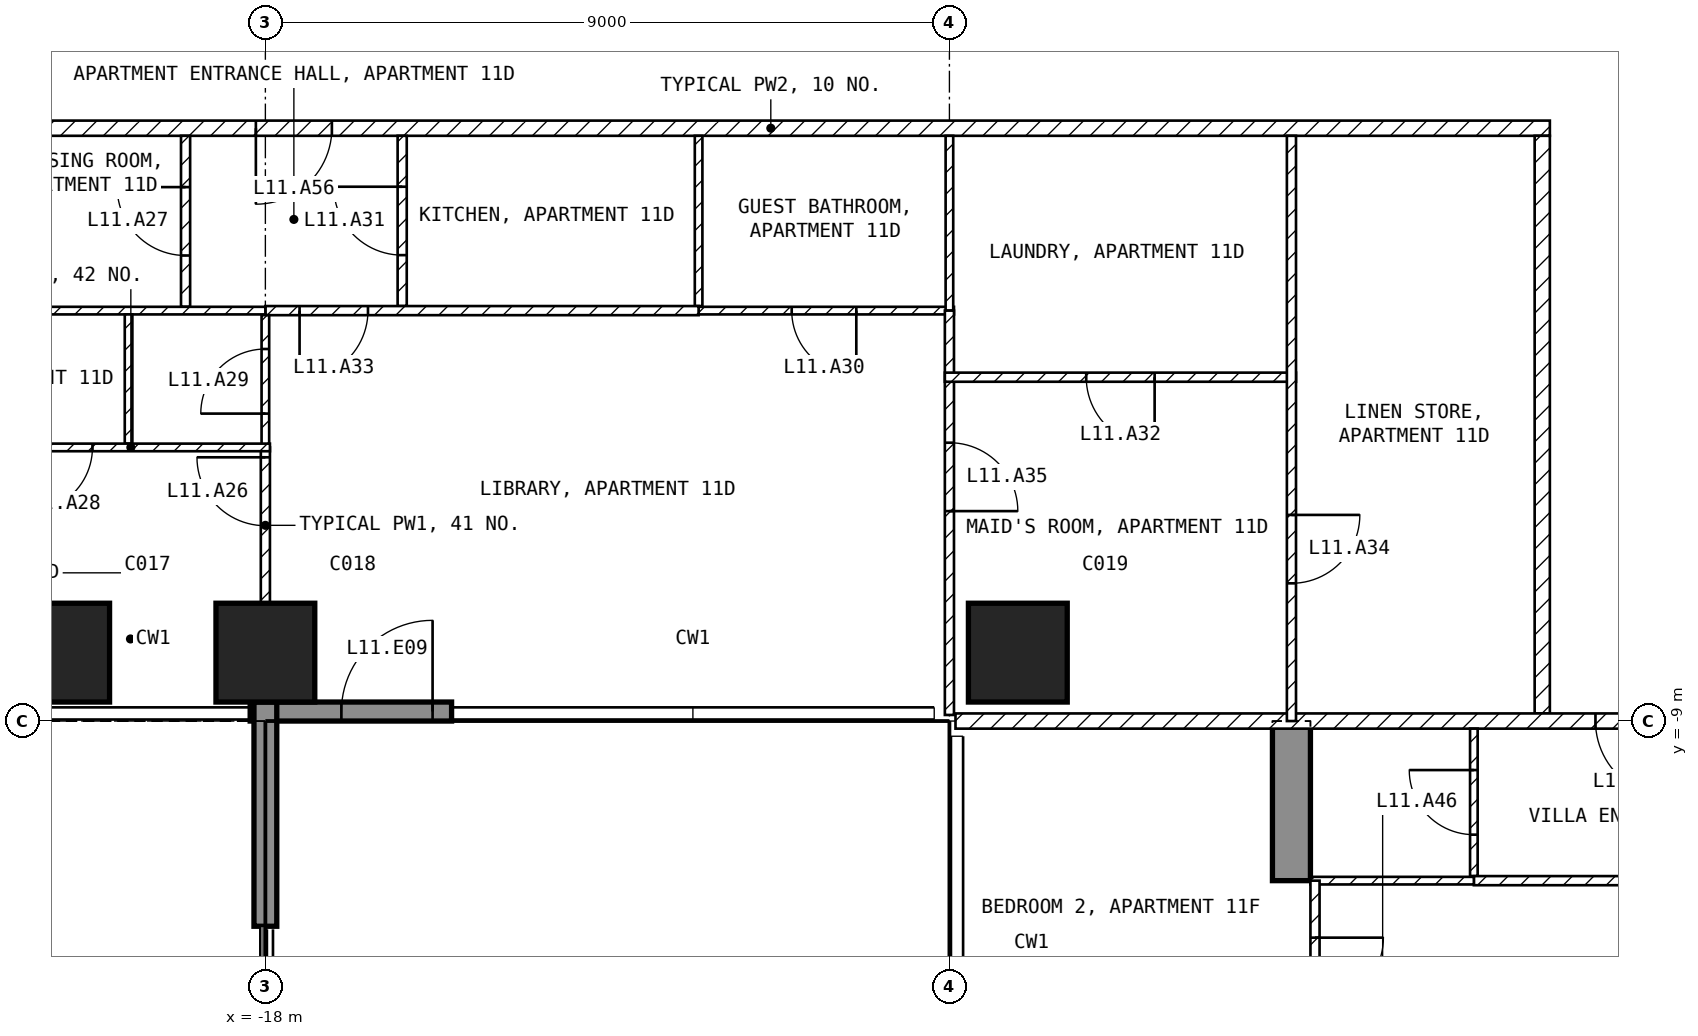
"""IFC4 building model, lengths in metres.
Left out: names, types, materials, properties, quantities, classifications, styles, units other than length and angle.
Written with IfcOpenShell. Run it as: python <this file> out.ifc"""

import sys

from ifc_helpers import new_model, si_unit, direction, frame, frame_2d, origin, origin_2d, place, context, subcontext, project, spatial, polyline, rectangle, outline, extrude, element, fill, save


model = new_model("IFC4")
c1 = context("Model", 3, precision=1e-05, world=origin(), true_north=direction((0.0, 1.0)))
c2 = subcontext(c1, "Body", "Model", "MODEL_VIEW")
j1 = project(units=[si_unit("LENGTHUNIT", "METRE"), si_unit("PLANEANGLEUNIT", "RADIAN")], contexts=[c1])
p1 = place(None, origin())
s1 = spatial("IfcSite", under=j1, at=p1, CompositionType="ELEMENT")
p2 = place(p1, origin())
s2 = spatial("IfcBuilding", under=s1, at=p2, CompositionType="ELEMENT")
p3 = place(p2, frame((0.0, 0.0, 57.5)))
s3 = spatial("IfcBuildingStorey", under=s2, at=p3, CompositionType="ELEMENT", Elevation=57.5)
for number, where, z_axis, x_axis in (
    (1, (-20.7, -8.1, -0.25), (0.0, 0.0, 1.0), (1.0, 0.0, 0.0)),
    (2, (-18.0, -8.1, -0.25), (0.0, 0.0, 1.0), (1.0, 0.0, 0.0)),
    (3, (-8.1, -8.1, -0.25), (0.0, 0.0, 1.0), (1.0, 0.0, 0.0)),
):
    element("IfcColumn", number, at=place(p3, frame(where, z_axis=z_axis, x_axis=x_axis)), inside=s3, PredefinedType="COLUMN", context=c2, shape_type="SweptSolid", body=[
        extrude(rectangle(XDim=1.3, YDim=1.3, at=origin_2d()), origin(), (0.0, 0.0, 1.0), 3.5),
    ])
p4 = place(p3, frame((-4.75, -25.45, -0.25), z_axis=(1.0, 0.0, 0.0), x_axis=(0.0, 1.0, 0.0)))
e4 = element("IfcWall", 4, at=p4, inside=s3, PredefinedType="SHEAR", context=c2, shape_type="SweptSolid", body=[
    extrude(outline(polyline([(0.0, 0.0), (4.15, 0.0), (4.15, 2.65), (6.55, 2.65), (6.55, 0.0), (11.95, 0.0), (11.95, 2.65), (14.35, 2.65), (14.35, 0.0), (16.45, 0.0), (16.45, 3.5), (0.0, 3.5), (0.0, 0.0)])), origin(), (0.0, 0.0, 1.0), 0.5),
])
p5 = place(p3, frame((-18.2, -8.875, 0.0), z_axis=(0.0, 0.0, 1.0), x_axis=(1.0, 0.0, 0.0)))
e5 = element("IfcWall", 5, at=p5, inside=s3, PredefinedType="SOLIDWALL", context=c2, shape_type="SweptSolid", body=[
    extrude(rectangle(XDim=2.65, YDim=0.25, at=frame_2d((1.325, 0.0))), origin(), (0.0, 0.0, 1.0), 3.25),
])
p6 = place(p5, frame((1.2, 0.0, 0.0)))
e6 = element("IfcOpeningElement", 6, at=p6, cuts=e5, PredefinedType="OPENING", context=c2, shape_type="SweptSolid", body=[
    extrude(rectangle(XDim=1.2, YDim=2.4, at=frame_2d((0.6, 1.2))), frame((0.0, 0.135, 0.0), z_axis=(0.0, -1.0, 0.0), x_axis=(1.0, 0.0, 0.0)), (0.0, 0.0, 1.0), 0.27),
])
p7 = place(p3, frame((-18.0, -8.75, 0.0), z_axis=(0.0, 0.0, 1.0), x_axis=(0.0, -1.0, 0.0)))
e7 = element("IfcWall", 7, at=p7, inside=s3, PredefinedType="SOLIDWALL", context=c2, shape_type="SweptSolid", body=[
    extrude(rectangle(XDim=2.95, YDim=0.3, at=frame_2d((1.475, 0.0))), origin(), (0.0, 0.0, 1.0), 3.25),
])
p8 = place(p3, frame((-1.1, -1.2, 0.0), z_axis=(0.0, 0.0, 1.0), x_axis=(-1.0, 0.0, 0.0)))
e8 = element("IfcWall", 8, at=p8, inside=s3, PredefinedType="PARTITIONING", context=c2, shape_type="SweptSolid", body=[
    extrude(rectangle(XDim=20.5, YDim=0.2, at=frame_2d((10.25, 0.0))), origin(), (0.0, 0.0, 1.0), 3.25),
])
p9 = place(p8, frame((16.025, 0.0, 0.0)))
e9 = element("IfcOpeningElement", 9, at=p9, cuts=e8, PredefinedType="OPENING", context=c2, shape_type="SweptSolid", body=[
    extrude(rectangle(XDim=1.0, YDim=2.1, at=frame_2d((0.5, 1.05))), frame((0.0, 0.11, 0.0), z_axis=(0.0, -1.0, 0.0), x_axis=(1.0, 0.0, 0.0)), (0.0, 0.0, 1.0), 0.22),
])
p10 = place(p3, frame((-1.2, -8.9, 0.0), z_axis=(0.0, 0.0, 1.0), x_axis=(0.0, 1.0, 0.0)))
e10 = element("IfcWall", 10, at=p10, inside=s3, PredefinedType="PARTITIONING", context=c2, shape_type="SweptSolid", body=[
    extrude(rectangle(XDim=7.6, YDim=0.2, at=frame_2d((3.8, 0.0))), origin(), (0.0, 0.0, 1.0), 3.25),
])
p11 = place(p3, frame((8.92, -9.0, 0.0), z_axis=(0.0, 0.0, 1.0), x_axis=(-1.0, 0.0, 0.0)))
e11 = element("IfcWall", 11, at=p11, inside=s3, PredefinedType="PARTITIONING", context=c2, shape_type="SweptSolid", body=[
    extrude(rectangle(XDim=17.84, YDim=0.2, at=frame_2d((8.92, 0.0))), origin(), (0.0, 0.0, 1.0), 3.25),
])
p12 = place(p11, frame((8.42, 0.0, 0.0)))
e12 = element("IfcOpeningElement", 12, at=p12, cuts=e11, PredefinedType="OPENING", context=c2, shape_type="SweptSolid", body=[
    extrude(rectangle(XDim=1.0, YDim=2.1, at=frame_2d((0.5, 1.05))), frame((0.0, 0.11, 0.0), z_axis=(0.0, -1.0, 0.0), x_axis=(1.0, 0.0, 0.0)), (0.0, 0.0, 1.0), 0.22),
])
p13 = place(p3, frame((-12.3, -3.54, 0.0), z_axis=(0.0, 0.0, 1.0), x_axis=(0.0, 1.0, 0.0)))
e13 = element("IfcWall", 13, at=p13, inside=s3, PredefinedType="PARTITIONING", context=c2, shape_type="SweptSolid", body=[
    extrude(rectangle(XDim=2.24, YDim=0.1, at=frame_2d((1.12, 0.0))), origin(), (0.0, 0.0, 1.0), 3.25),
])
p14 = place(p3, frame((-8.94, -3.6, 0.0), z_axis=(0.0, 0.0, 1.0), x_axis=(-1.0, 0.0, 0.0)))
e14 = element("IfcWall", 14, at=p14, inside=s3, PredefinedType="PARTITIONING", context=c2, shape_type="SweptSolid", body=[
    extrude(rectangle(XDim=3.36, YDim=0.1, at=frame_2d((1.68, 0.0))), origin(), (0.0, 0.0, 1.0), 3.25),
])
p15 = place(p14, frame((1.285, 0.0, 0.0)))
e15 = element("IfcOpeningElement", 15, at=p15, cuts=e14, PredefinedType="OPENING", context=c2, shape_type="SweptSolid", body=[
    extrude(rectangle(XDim=0.85, YDim=2.1, at=frame_2d((0.425, 1.05))), frame((0.0, 0.06, 0.0), z_axis=(0.0, -1.0, 0.0), x_axis=(1.0, 0.0, 0.0)), (0.0, 0.0, 1.0), 0.12),
])
p16 = place(p3, frame((-9.0, -1.3, 0.0), z_axis=(0.0, 0.0, 1.0), x_axis=(0.0, -1.0, 0.0)))
e16 = element("IfcWall", 16, at=p16, inside=s3, PredefinedType="PARTITIONING", context=c2, shape_type="SweptSolid", body=[
    extrude(rectangle(XDim=2.3, YDim=0.1, at=frame_2d((1.15, 0.0))), origin(), (0.0, 0.0, 1.0), 3.25),
])
p17 = place(p3, frame((-16.2, -3.54, 0.0), z_axis=(0.0, 0.0, 1.0), x_axis=(0.0, 1.0, 0.0)))
e17 = element("IfcWall", 17, at=p17, inside=s3, PredefinedType="PARTITIONING", context=c2, shape_type="SweptSolid", body=[
    extrude(rectangle(XDim=2.24, YDim=0.12, at=frame_2d((1.12, 0.0))), origin(), (0.0, 0.0, 1.0), 3.25),
])
p18 = place(p17, frame((0.67, 0.0, 0.0)))
e18 = element("IfcOpeningElement", 18, at=p18, cuts=e17, PredefinedType="OPENING", context=c2, shape_type="SweptSolid", body=[
    extrude(rectangle(XDim=0.9, YDim=2.1, at=frame_2d((0.45, 1.05))), frame((0.0, 0.07, 0.0), z_axis=(0.0, -1.0, 0.0), x_axis=(1.0, 0.0, 0.0)), (0.0, 0.0, 1.0), 0.14),
])
p19 = place(p3, frame((-12.3, -3.6, 0.0), z_axis=(0.0, 0.0, 1.0), x_axis=(-1.0, 0.0, 0.0)))
e19 = element("IfcWall", 19, at=p19, inside=s3, PredefinedType="PARTITIONING", context=c2, shape_type="SweptSolid", body=[
    extrude(rectangle(XDim=5.7, YDim=0.12, at=frame_2d((2.85, 0.0))), origin(), (0.0, 0.0, 1.0), 3.25),
])
p20 = place(p19, frame((4.35, 0.0, 0.0)))
e20 = element("IfcOpeningElement", 20, at=p20, cuts=e19, PredefinedType="OPENING", context=c2, shape_type="SweptSolid", body=[
    extrude(rectangle(XDim=0.9, YDim=2.1, at=frame_2d((0.45, 1.05))), frame((0.0, 0.07, 0.0), z_axis=(0.0, -1.0, 0.0), x_axis=(1.0, 0.0, 0.0)), (0.0, 0.0, 1.0), 0.14),
])
p21 = place(p3, frame((-19.05, -3.55, 0.0), z_axis=(0.0, 0.0, 1.0), x_axis=(0.0, 1.0, 0.0)))
e21 = element("IfcWall", 21, at=p21, inside=s3, PredefinedType="PARTITIONING", context=c2, shape_type="SweptSolid", body=[
    extrude(rectangle(XDim=2.25, YDim=0.12, at=frame_2d((1.125, 0.0))), origin(), (0.0, 0.0, 1.0), 3.25),
])
p22 = place(p21, frame((0.675, 0.0, 0.0)))
e22 = element("IfcOpeningElement", 22, at=p22, cuts=e21, PredefinedType="OPENING", context=c2, shape_type="SweptSolid", body=[
    extrude(rectangle(XDim=0.9, YDim=2.1, at=frame_2d((0.45, 1.05))), frame((0.0, 0.07, 0.0), z_axis=(0.0, -1.0, 0.0), x_axis=(1.0, 0.0, 0.0)), (0.0, 0.0, 1.0), 0.14),
])
p23 = place(p3, frame((-18.0, -3.6, 0.0), z_axis=(0.0, 0.0, 1.0), x_axis=(-1.0, 0.0, 0.0)))
e23 = element("IfcWall", 23, at=p23, inside=s3, PredefinedType="PARTITIONING", context=c2, shape_type="SweptSolid", body=[
    extrude(rectangle(XDim=3.6, YDim=0.1, at=frame_2d((1.8, 0.0))), origin(), (0.0, 0.0, 1.0), 3.25),
])
p24 = place(p3, frame((-18.0, -5.4, 0.0), z_axis=(0.0, 0.0, 1.0), x_axis=(0.0, 1.0, 0.0)))
e24 = element("IfcWall", 24, at=p24, inside=s3, PredefinedType="PARTITIONING", context=c2, shape_type="SweptSolid", body=[
    extrude(rectangle(XDim=1.74, YDim=0.1, at=frame_2d((0.87, 0.0))), origin(), (0.0, 0.0, 1.0), 2.346),
])
p25 = place(p24, frame((0.445, 0.0, 0.0)))
e25 = element("IfcOpeningElement", 25, at=p25, cuts=e24, PredefinedType="OPENING", context=c2, shape_type="SweptSolid", body=[
    extrude(rectangle(XDim=0.85, YDim=2.1, at=frame_2d((0.425, 1.05))), frame((0.0, 0.06, 0.0), z_axis=(0.0, -1.0, 0.0), x_axis=(1.0, 0.0, 0.0)), (0.0, 0.0, 1.0), 0.12),
])
p26 = place(p3, frame((-18.0, -7.45, 0.0), z_axis=(0.0, 0.0, 1.0), x_axis=(0.0, 1.0, 0.0)))
e26 = element("IfcWall", 26, at=p26, inside=s3, PredefinedType="PARTITIONING", context=c2, shape_type="SweptSolid", body=[
    extrude(rectangle(XDim=2.05, YDim=0.12, at=frame_2d((1.025, 0.0))), origin(), (0.0, 0.0, 1.0), 2.346),
])
p27 = place(p26, frame((1.02, 0.0, 0.0)))
e27 = element("IfcOpeningElement", 27, at=p27, cuts=e26, PredefinedType="OPENING", context=c2, shape_type="SweptSolid", body=[
    extrude(rectangle(XDim=0.9, YDim=2.1, at=frame_2d((0.45, 1.05))), frame((0.0, 0.07, 0.0), z_axis=(0.0, -1.0, 0.0), x_axis=(1.0, 0.0, 0.0)), (0.0, 0.0, 1.0), 0.14),
])
p28 = place(p3, frame((-9.0, -3.6, 0.0), z_axis=(0.0, 0.0, 1.0), x_axis=(0.0, -1.0, 0.0)))
e28 = element("IfcWall", 28, at=p28, inside=s3, PredefinedType="PARTITIONING", context=c2, shape_type="SweptSolid", body=[
    extrude(rectangle(XDim=5.32, YDim=0.12, at=frame_2d((2.66, 0.0))), origin(), (0.0, 0.0, 1.0), 3.25),
])
p29 = place(p28, frame((1.738, 0.0, 0.0)))
e29 = element("IfcOpeningElement", 29, at=p29, cuts=e28, PredefinedType="OPENING", context=c2, shape_type="SweptSolid", body=[
    extrude(rectangle(XDim=0.9, YDim=2.1, at=frame_2d((0.45, 1.05))), frame((0.0, 0.07, 0.0), z_axis=(0.0, -1.0, 0.0), x_axis=(1.0, 0.0, 0.0)), (0.0, 0.0, 1.0), 0.14),
])
p30 = place(p3, frame((-19.8, -5.35, 0.0), z_axis=(0.0, 0.0, 1.0), x_axis=(0.0, 1.0, 0.0)))
e30 = element("IfcWall", 30, at=p30, inside=s3, PredefinedType="PARTITIONING", context=c2, shape_type="SweptSolid", body=[
    extrude(rectangle(XDim=1.7, YDim=0.1, at=frame_2d((0.85, 0.0))), origin(), (0.0, 0.0, 1.0), 3.25),
])
p31 = place(p3, frame((-17.94, -5.4, 0.0), z_axis=(0.0, 0.0, 1.0), x_axis=(-1.0, 0.0, 0.0)))
e31 = element("IfcWall", 31, at=p31, inside=s3, PredefinedType="PARTITIONING", context=c2, shape_type="SweptSolid", body=[
    extrude(rectangle(XDim=3.66, YDim=0.1, at=frame_2d((1.83, 0.0))), origin(), (0.0, 0.0, 1.0), 3.25),
])
p32 = place(p31, frame((2.335, 0.0, 0.0)))
e32 = element("IfcOpeningElement", 32, at=p32, cuts=e31, PredefinedType="OPENING", context=c2, shape_type="SweptSolid", body=[
    extrude(rectangle(XDim=0.85, YDim=2.1, at=frame_2d((0.425, 1.05))), frame((0.0, 0.06, 0.0), z_axis=(0.0, -1.0, 0.0), x_axis=(1.0, 0.0, 0.0)), (0.0, 0.0, 1.0), 0.12),
])
p33 = place(p3, frame((-4.44, -4.476, 0.0), z_axis=(0.0, 0.0, 1.0), x_axis=(-1.0, 0.0, 0.0)))
e33 = element("IfcWall", 33, at=p33, inside=s3, PredefinedType="PARTITIONING", context=c2, shape_type="SweptSolid", body=[
    extrude(rectangle(XDim=4.62, YDim=0.12, at=frame_2d((2.31, 0.0))), origin(), (0.0, 0.0, 1.0), 3.25),
])
p34 = place(p33, frame((1.86, 0.0, 0.0)))
e34 = element("IfcOpeningElement", 34, at=p34, cuts=e33, PredefinedType="OPENING", context=c2, shape_type="SweptSolid", body=[
    extrude(rectangle(XDim=0.9, YDim=2.1, at=frame_2d((0.45, 1.05))), frame((0.0, 0.07, 0.0), z_axis=(0.0, -1.0, 0.0), x_axis=(1.0, 0.0, 0.0)), (0.0, 0.0, 1.0), 0.14),
])
p35 = place(p3, frame((-4.5, -1.3, 0.0), z_axis=(0.0, 0.0, 1.0), x_axis=(0.0, -1.0, 0.0)))
e35 = element("IfcWall", 35, at=p35, inside=s3, PredefinedType="PARTITIONING", context=c2, shape_type="SweptSolid", body=[
    extrude(rectangle(XDim=7.7, YDim=0.12, at=frame_2d((3.85, 0.0))), origin(), (0.0, 0.0, 1.0), 3.25),
])
p36 = place(p35, frame((4.988, 0.0, 0.0)))
e36 = element("IfcOpeningElement", 36, at=p36, cuts=e35, PredefinedType="OPENING", context=c2, shape_type="SweptSolid", body=[
    extrude(rectangle(XDim=0.9, YDim=2.1, at=frame_2d((0.45, 1.05))), frame((0.0, 0.07, 0.0), z_axis=(0.0, -1.0, 0.0), x_axis=(1.0, 0.0, 0.0)), (0.0, 0.0, 1.0), 0.14),
])
p37 = place(p3, frame((-2.1, -11.04, 0.0), z_axis=(0.0, 0.0, 1.0), x_axis=(0.0, 1.0, 0.0)))
e37 = element("IfcWall", 37, at=p37, inside=s3, PredefinedType="PARTITIONING", context=c2, shape_type="SweptSolid", body=[
    extrude(rectangle(XDim=1.94, YDim=0.1, at=frame_2d((0.97, 0.0))), origin(), (0.0, 0.0, 1.0), 3.25),
])
p38 = place(p37, frame((0.545, 0.0, 0.0)))
e38 = element("IfcOpeningElement", 38, at=p38, cuts=e37, PredefinedType="OPENING", context=c2, shape_type="SweptSolid", body=[
    extrude(rectangle(XDim=0.85, YDim=2.1, at=frame_2d((0.425, 1.05))), frame((0.0, 0.06, 0.0), z_axis=(0.0, -1.0, 0.0), x_axis=(1.0, 0.0, 0.0)), (0.0, 0.0, 1.0), 0.12),
])
p39 = place(p3, frame((4.25, -11.1, 0.0), z_axis=(0.0, 0.0, 1.0), x_axis=(-1.0, 0.0, 0.0)))
e39 = element("IfcWall", 39, at=p39, inside=s3, PredefinedType="PARTITIONING", context=c2, shape_type="SweptSolid", body=[
    extrude(rectangle(XDim=6.35, YDim=0.12, at=frame_2d((3.175, 0.0))), origin(), (0.0, 0.0, 1.0), 3.25),
])
p40 = place(p39, frame((2.725, 0.0, 0.0)))
e40 = element("IfcOpeningElement", 40, at=p40, cuts=e39, PredefinedType="OPENING", context=c2, shape_type="SweptSolid", body=[
    extrude(rectangle(XDim=0.9, YDim=2.1, at=frame_2d((0.45, 1.05))), frame((0.0, 0.07, 0.0), z_axis=(0.0, -1.0, 0.0), x_axis=(1.0, 0.0, 0.0)), (0.0, 0.0, 1.0), 0.14),
])
p41 = place(p3, frame((-2.1, -11.1, 0.0), z_axis=(0.0, 0.0, 1.0), x_axis=(-1.0, 0.0, 0.0)))
e41 = element("IfcWall", 41, at=p41, inside=s3, PredefinedType="PARTITIONING", context=c2, shape_type="SweptSolid", body=[
    extrude(rectangle(XDim=2.15, YDim=0.1, at=frame_2d((1.075, 0.0))), origin(), (0.0, 0.0, 1.0), 3.25),
])
p42 = place(p3, frame((-4.19, -11.1, 0.0), z_axis=(0.0, 0.0, 1.0), x_axis=(0.0, -1.0, 0.0)))
e42 = element("IfcWall", 42, at=p42, inside=s3, PredefinedType="PARTITIONING", context=c2, shape_type="SweptSolid", body=[
    extrude(rectangle(XDim=2.4, YDim=0.12, at=frame_2d((1.2, 0.0))), origin(), (0.0, 0.0, 1.0), 2.4),
])
p43 = place(p42, frame((0.75, 0.0, 0.0)))
e43 = element("IfcOpeningElement", 43, at=p43, cuts=e42, PredefinedType="OPENING", context=c2, shape_type="SweptSolid", body=[
    extrude(rectangle(XDim=0.9, YDim=2.1, at=frame_2d((0.45, 1.05))), frame((0.0, 0.07, 0.0), z_axis=(0.0, -1.0, 0.0), x_axis=(1.0, 0.0, 0.0)), (0.0, 0.0, 1.0), 0.14),
])
p44 = place(p6, origin())
e44 = element("IfcDoor", 44, at=p44, inside=s3, OperationType="SINGLE_SWING_RIGHT", PredefinedType="DOOR", context=c2, shape_type="SweptSolid", body=[
    extrude(rectangle(XDim=1.2, YDim=2.4, at=frame_2d((0.6, 1.2))), frame((0.0, 0.025, 0.0), z_axis=(0.0, -1.0, 0.0), x_axis=(1.0, 0.0, 0.0)), (0.0, 0.0, 1.0), 0.05),
])
fill(e6, e44)
p45 = place(p27, origin())
e45 = element("IfcDoor", 45, at=p45, inside=s3, OperationType="SINGLE_SWING_RIGHT", PredefinedType="DOOR", context=c2, shape_type="SweptSolid", body=[
    extrude(rectangle(XDim=0.9, YDim=2.1, at=frame_2d((0.45, 1.05))), frame((0.0, 0.025, 0.0), z_axis=(0.0, -1.0, 0.0), x_axis=(1.0, 0.0, 0.0)), (0.0, 0.0, 1.0), 0.05),
])
fill(e27, e45)
p46 = place(p22, origin())
e46 = element("IfcDoor", 46, at=p46, inside=s3, OperationType="SINGLE_SWING_RIGHT", PredefinedType="DOOR", context=c2, shape_type="SweptSolid", body=[
    extrude(rectangle(XDim=0.9, YDim=2.1, at=frame_2d((0.45, 1.05))), frame((0.0, 0.025, 0.0), z_axis=(0.0, -1.0, 0.0), x_axis=(1.0, 0.0, 0.0)), (0.0, 0.0, 1.0), 0.05),
])
fill(e22, e46)
p47 = place(p32, origin())
e47 = element("IfcDoor", 47, at=p47, inside=s3, OperationType="SINGLE_SWING_RIGHT", PredefinedType="DOOR", context=c2, shape_type="SweptSolid", body=[
    extrude(rectangle(XDim=0.85, YDim=2.1, at=frame_2d((0.425, 1.05))), frame((0.0, 0.025, 0.0), z_axis=(0.0, -1.0, 0.0), x_axis=(1.0, 0.0, 0.0)), (0.0, 0.0, 1.0), 0.05),
])
fill(e32, e47)
p48 = place(p25, origin())
e48 = element("IfcDoor", 48, at=p48, inside=s3, OperationType="SINGLE_SWING_LEFT", PredefinedType="DOOR", context=c2, shape_type="SweptSolid", body=[
    extrude(rectangle(XDim=0.85, YDim=2.1, at=frame_2d((0.425, 1.05))), frame((0.0, 0.025, 0.0), z_axis=(0.0, -1.0, 0.0), x_axis=(1.0, 0.0, 0.0)), (0.0, 0.0, 1.0), 0.05),
])
fill(e25, e48)
p49 = place(p15, origin())
e49 = element("IfcDoor", 49, at=p49, inside=s3, OperationType="SINGLE_SWING_LEFT", PredefinedType="DOOR", context=c2, shape_type="SweptSolid", body=[
    extrude(rectangle(XDim=0.85, YDim=2.1, at=frame_2d((0.425, 1.05))), frame((0.0, 0.025, 0.0), z_axis=(0.0, -1.0, 0.0), x_axis=(1.0, 0.0, 0.0)), (0.0, 0.0, 1.0), 0.05),
])
fill(e15, e49)
p50 = place(p18, origin())
e50 = element("IfcDoor", 50, at=p50, inside=s3, OperationType="SINGLE_SWING_RIGHT", PredefinedType="DOOR", context=c2, shape_type="SweptSolid", body=[
    extrude(rectangle(XDim=0.9, YDim=2.1, at=frame_2d((0.45, 1.05))), frame((0.0, 0.025, 0.0), z_axis=(0.0, -1.0, 0.0), x_axis=(1.0, 0.0, 0.0)), (0.0, 0.0, 1.0), 0.05),
])
fill(e18, e50)
p51 = place(p34, origin())
e51 = element("IfcDoor", 51, at=p51, inside=s3, OperationType="SINGLE_SWING_LEFT", PredefinedType="DOOR", context=c2, shape_type="SweptSolid", body=[
    extrude(rectangle(XDim=0.9, YDim=2.1, at=frame_2d((0.45, 1.05))), frame((0.0, 0.025, 0.0), z_axis=(0.0, -1.0, 0.0), x_axis=(1.0, 0.0, 0.0)), (0.0, 0.0, 1.0), 0.05),
])
fill(e34, e51)
p52 = place(p20, origin())
e52 = element("IfcDoor", 52, at=p52, inside=s3, OperationType="SINGLE_SWING_RIGHT", PredefinedType="DOOR", context=c2, shape_type="SweptSolid", body=[
    extrude(rectangle(XDim=0.9, YDim=2.1, at=frame_2d((0.45, 1.05))), frame((0.0, 0.025, 0.0), z_axis=(0.0, -1.0, 0.0), x_axis=(1.0, 0.0, 0.0)), (0.0, 0.0, 1.0), 0.05),
])
fill(e20, e52)
p53 = place(p36, origin())
e53 = element("IfcDoor", 53, at=p53, inside=s3, OperationType="SINGLE_SWING_LEFT", PredefinedType="DOOR", context=c2, shape_type="SweptSolid", body=[
    extrude(rectangle(XDim=0.9, YDim=2.1, at=frame_2d((0.45, 1.05))), frame((0.0, 0.025, 0.0), z_axis=(0.0, -1.0, 0.0), x_axis=(1.0, 0.0, 0.0)), (0.0, 0.0, 1.0), 0.05),
])
fill(e36, e53)
p54 = place(p29, origin())
e54 = element("IfcDoor", 54, at=p54, inside=s3, OperationType="SINGLE_SWING_RIGHT", PredefinedType="DOOR", context=c2, shape_type="SweptSolid", body=[
    extrude(rectangle(XDim=0.9, YDim=2.1, at=frame_2d((0.45, 1.05))), frame((0.0, 0.025, 0.0), z_axis=(0.0, -1.0, 0.0), x_axis=(1.0, 0.0, 0.0)), (0.0, 0.0, 1.0), 0.05),
])
fill(e29, e54)
p55 = place(p12, origin())
e55 = element("IfcDoor", 55, at=p55, inside=s3, OperationType="SINGLE_SWING_LEFT", PredefinedType="DOOR", context=c2, shape_type="SweptSolid", body=[
    extrude(rectangle(XDim=1.0, YDim=2.1, at=frame_2d((0.5, 1.05))), frame((0.0, 0.025, 0.0), z_axis=(0.0, -1.0, 0.0), x_axis=(1.0, 0.0, 0.0)), (0.0, 0.0, 1.0), 0.05),
])
fill(e12, e55)
p56 = place(p38, origin())
e56 = element("IfcDoor", 56, at=p56, inside=s3, OperationType="SINGLE_SWING_RIGHT", PredefinedType="DOOR", context=c2, shape_type="SweptSolid", body=[
    extrude(rectangle(XDim=0.85, YDim=2.1, at=frame_2d((0.425, 1.05))), frame((0.0, 0.025, 0.0), z_axis=(0.0, -1.0, 0.0), x_axis=(1.0, 0.0, 0.0)), (0.0, 0.0, 1.0), 0.05),
])
fill(e38, e56)
p57 = place(p9, origin())
e57 = element("IfcDoor", 57, at=p57, inside=s3, OperationType="SINGLE_SWING_RIGHT", PredefinedType="DOOR", context=c2, shape_type="SweptSolid", body=[
    extrude(rectangle(XDim=1.0, YDim=2.1, at=frame_2d((0.5, 1.05))), frame((0.0, 0.025, 0.0), z_axis=(0.0, -1.0, 0.0), x_axis=(1.0, 0.0, 0.0)), (0.0, 0.0, 1.0), 0.05),
])
fill(e9, e57)
p58 = place(p43, origin())
e58 = element("IfcDoor", 58, at=p58, inside=s3, OperationType="SINGLE_SWING_LEFT", PredefinedType="DOOR", context=c2, shape_type="SweptSolid", body=[
    extrude(rectangle(XDim=0.9, YDim=2.1, at=frame_2d((0.45, 1.05))), frame((0.0, 0.025, 0.0), z_axis=(0.0, -1.0, 0.0), x_axis=(1.0, 0.0, 0.0)), (0.0, 0.0, 1.0), 0.05),
])
fill(e43, e58)
save(model, sys.argv[1])
